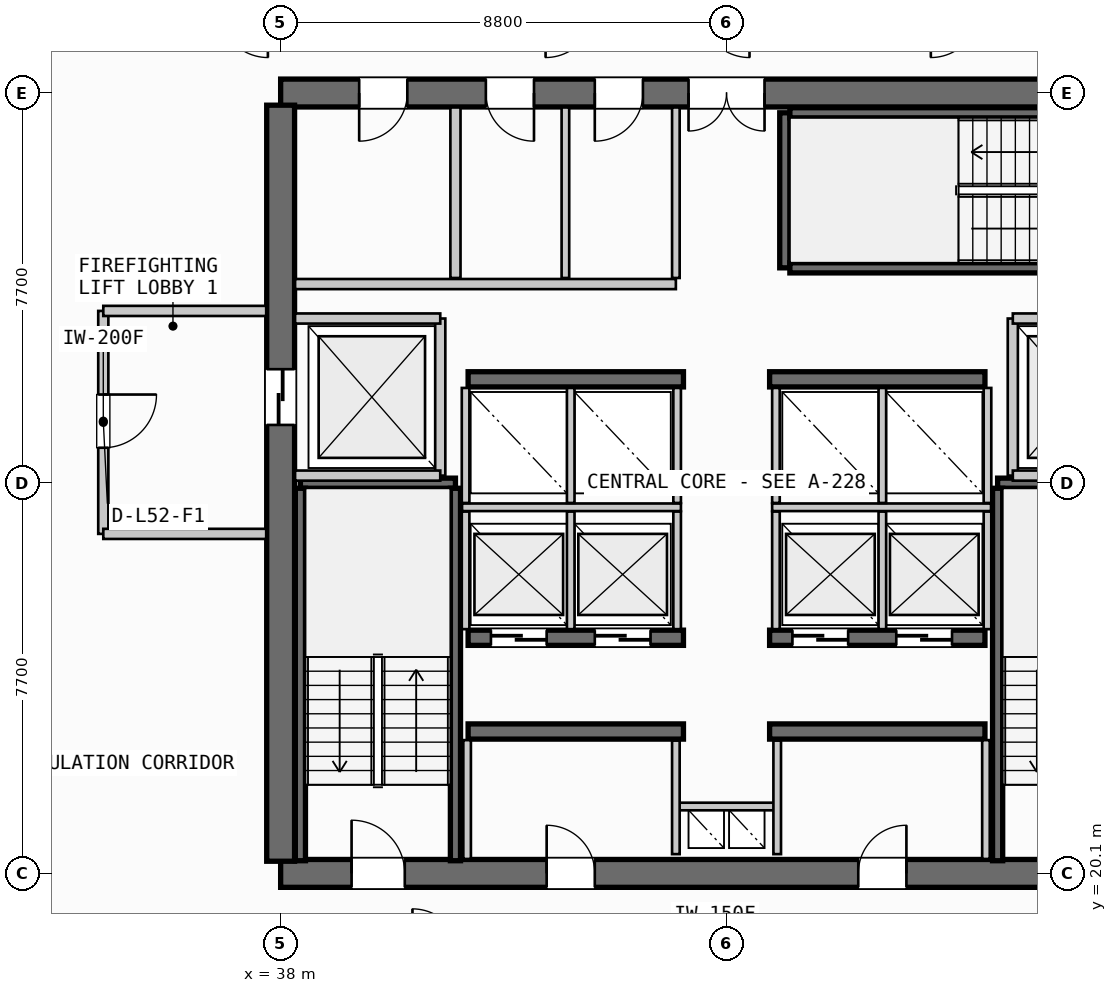
"""IFC4 building model, lengths in metres.
Left out: names, types, materials, properties, quantities, classifications, styles, units other than length and angle.
Written with IfcOpenShell. Run it as: python <this file> out.ifc"""

import sys

from ifc_helpers import new_model, si_unit, direction, frame, frame_2d, origin, place, context, subcontext, project, spatial, rectangle, extrude, source, transform, mapped, element, fill, save


model = new_model("IFC4")
c1 = context("Model", 3, precision=1e-05, world=origin(), true_north=direction((0.0, 1.0)))
c2 = subcontext(c1, "Body", "Model", "MODEL_VIEW")
j1 = project(units=[si_unit("LENGTHUNIT", "METRE"), si_unit("PLANEANGLEUNIT", "RADIAN")], contexts=[c1])
p1 = place(None, origin())
s1 = spatial("IfcSite", under=j1, at=p1, CompositionType="ELEMENT")
p2 = place(p1, origin())
s2 = spatial("IfcBuilding", under=s1, at=p2, CompositionType="ELEMENT")
p3 = place(p2, frame((0.0, 0.0, 200.9)))
s3 = spatial("IfcBuildingStorey", under=s2, at=p3, CompositionType="ELEMENT", Elevation=200.9)
p4 = place(p3, frame((38.0, 20.1, 0.0), z_axis=(0.0, 0.0, 1.0), x_axis=(1.0, 0.0, 0.0)))
e1 = element("IfcWall", 1, at=p4, inside=s3, PredefinedType="SHEAR", context=c2, shape_type="SweptSolid", body=[
    extrude(rectangle(XDim=17.6, YDim=0.55, at=frame_2d((8.8, 0.0))), origin(), (0.0, 0.0, 1.0), 3.26),
])
p5 = place(p4, frame((1.4, 0.0, 0.0)))
e2 = element("IfcOpeningElement", 2, at=p5, cuts=e1, PredefinedType="OPENING", context=c2, shape_type="SweptSolid", body=[
    extrude(rectangle(XDim=1.05, YDim=2.15, at=frame_2d((0.525, 1.075))), frame((0.0, 0.285, 0.0), z_axis=(0.0, -1.0, 0.0), x_axis=(1.0, 0.0, 0.0)), (0.0, 0.0, 1.0), 0.57),
])
p6 = place(p4, frame((15.15, 0.0, 0.0)))
e3 = element("IfcOpeningElement", 3, at=p6, cuts=e1, PredefinedType="OPENING", context=c2, shape_type="SweptSolid", body=[
    extrude(rectangle(XDim=1.05, YDim=2.15, at=frame_2d((0.525, 1.075))), frame((0.0, 0.285, 0.0), z_axis=(0.0, -1.0, 0.0), x_axis=(1.0, 0.0, 0.0)), (0.0, 0.0, 1.0), 0.57),
])
p7 = place(p4, frame((5.25, 0.0, 0.0)))
e4 = element("IfcOpeningElement", 4, at=p7, cuts=e1, PredefinedType="OPENING", context=c2, shape_type="SweptSolid", body=[
    extrude(rectangle(XDim=0.95, YDim=2.15, at=frame_2d((0.475, 1.075))), frame((0.0, 0.285, 0.0), z_axis=(0.0, -1.0, 0.0), x_axis=(1.0, 0.0, 0.0)), (0.0, 0.0, 1.0), 0.57),
])
p8 = place(p4, frame((11.4, 0.0, 0.0)))
e5 = element("IfcOpeningElement", 5, at=p8, cuts=e1, PredefinedType="OPENING", context=c2, shape_type="SweptSolid", body=[
    extrude(rectangle(XDim=0.95, YDim=2.15, at=frame_2d((0.475, 1.075))), frame((0.0, 0.285, 0.0), z_axis=(0.0, -1.0, 0.0), x_axis=(1.0, 0.0, 0.0)), (0.0, 0.0, 1.0), 0.57),
])
p9 = place(p3, frame((55.6, 35.5, 0.0), z_axis=(0.0, 0.0, 1.0), x_axis=(-1.0, 0.0, 0.0)))
e6 = element("IfcWall", 6, at=p9, inside=s3, PredefinedType="SHEAR", context=c2, shape_type="SweptSolid", body=[
    extrude(rectangle(XDim=17.6, YDim=0.55, at=frame_2d((8.8, 0.0))), origin(), (0.0, 0.0, 1.0), 3.26),
])
p10 = place(p9, frame((8.05, 0.0, 0.0)))
e7 = element("IfcOpeningElement", 7, at=p10, cuts=e6, PredefinedType="OPENING", context=c2, shape_type="SweptSolid", body=[
    extrude(rectangle(XDim=1.5, YDim=2.2, at=frame_2d((0.75, 1.1))), frame((0.0, 0.285, 0.0), z_axis=(0.0, -1.0, 0.0), x_axis=(1.0, 0.0, 0.0)), (0.0, 0.0, 1.0), 0.57),
])
p11 = place(p9, frame((15.1, 0.0, 0.0)))
e8 = element("IfcOpeningElement", 8, at=p11, cuts=e6, PredefinedType="OPENING", context=c2, shape_type="SweptSolid", body=[
    extrude(rectangle(XDim=0.95, YDim=2.15, at=frame_2d((0.475, 1.075))), frame((0.0, 0.285, 0.0), z_axis=(0.0, -1.0, 0.0), x_axis=(1.0, 0.0, 0.0)), (0.0, 0.0, 1.0), 0.57),
])
p12 = place(p9, frame((12.6, 0.0, 0.0)))
e9 = element("IfcOpeningElement", 9, at=p12, cuts=e6, PredefinedType="OPENING", context=c2, shape_type="SweptSolid", body=[
    extrude(rectangle(XDim=0.95, YDim=2.15, at=frame_2d((0.475, 1.075))), frame((0.0, 0.285, 0.0), z_axis=(0.0, -1.0, 0.0), x_axis=(1.0, 0.0, 0.0)), (0.0, 0.0, 1.0), 0.57),
])
p13 = place(p9, frame((10.45, 0.0, 0.0)))
e10 = element("IfcOpeningElement", 10, at=p13, cuts=e6, PredefinedType="OPENING", context=c2, shape_type="SweptSolid", body=[
    extrude(rectangle(XDim=0.95, YDim=2.15, at=frame_2d((0.475, 1.075))), frame((0.0, 0.285, 0.0), z_axis=(0.0, -1.0, 0.0), x_axis=(1.0, 0.0, 0.0)), (0.0, 0.0, 1.0), 0.57),
])
p14 = place(p3, frame((38.0, 35.26, 0.0), z_axis=(0.0, 0.0, 1.0), x_axis=(0.0, -1.0, 0.0)))
e11 = element("IfcWall", 11, at=p14, inside=s3, PredefinedType="SHEAR", context=c2, shape_type="SweptSolid", body=[
    extrude(rectangle(XDim=14.92, YDim=0.55, at=frame_2d((7.46, 0.0))), origin(), (0.0, 0.0, 1.0), 3.26),
])
p15 = place(p14, frame((5.21, 0.0, 0.0)))
e12 = element("IfcOpeningElement", 12, at=p15, cuts=e11, PredefinedType="OPENING", context=c2, shape_type="SweptSolid", body=[
    extrude(rectangle(XDim=1.1, YDim=2.2, at=frame_2d((0.55, 1.1))), frame((0.0, 0.285, 0.0), z_axis=(0.0, -1.0, 0.0), x_axis=(1.0, 0.0, 0.0)), (0.0, 0.0, 1.0), 0.57),
])
for number, where, z_axis, x_axis in (
    (13, (41.7, 22.9, 0.0), (0.0, 0.0, 1.0), (1.0, 0.0, 0.0)),
    (14, (47.65, 22.9, 0.0), (0.0, 0.0, 1.0), (1.0, 0.0, 0.0)),
):
    element("IfcWall", number, at=place(p3, frame(where, z_axis=z_axis, x_axis=x_axis)), inside=s3, PredefinedType="SHEAR", context=c2, shape_type="SweptSolid", body=[
        extrude(rectangle(XDim=4.25, YDim=0.3, at=frame_2d((2.125, 0.0))), origin(), (0.0, 0.0, 1.0), 3.26),
    ])
p16 = place(p3, frame((41.7, 24.75, 0.0), z_axis=(0.0, 0.0, 1.0), x_axis=(1.0, 0.0, 0.0)))
e15 = element("IfcWall", 15, at=p16, inside=s3, PredefinedType="SHEAR", context=c2, shape_type="SweptSolid", body=[
    extrude(rectangle(XDim=4.25, YDim=0.3, at=frame_2d((2.125, 0.0))), origin(), (0.0, 0.0, 1.0), 3.26),
])
p17 = place(p16, frame((0.45, 0.0, 0.0)))
e16 = element("IfcOpeningElement", 16, at=p17, cuts=e15, PredefinedType="OPENING", context=c2, shape_type="SweptSolid", body=[
    extrude(rectangle(XDim=1.1, YDim=2.2, at=frame_2d((0.55, 1.1))), frame((0.0, 0.16, 0.0), z_axis=(0.0, -1.0, 0.0), x_axis=(1.0, 0.0, 0.0)), (0.0, 0.0, 1.0), 0.32),
])
p18 = place(p16, frame((2.5, 0.0, 0.0)))
e17 = element("IfcOpeningElement", 17, at=p18, cuts=e15, PredefinedType="OPENING", context=c2, shape_type="SweptSolid", body=[
    extrude(rectangle(XDim=1.1, YDim=2.2, at=frame_2d((0.55, 1.1))), frame((0.0, 0.16, 0.0), z_axis=(0.0, -1.0, 0.0), x_axis=(1.0, 0.0, 0.0)), (0.0, 0.0, 1.0), 0.32),
])
p19 = place(p3, frame((47.65, 24.75, 0.0), z_axis=(0.0, 0.0, 1.0), x_axis=(1.0, 0.0, 0.0)))
e18 = element("IfcWall", 18, at=p19, inside=s3, PredefinedType="SHEAR", context=c2, shape_type="SweptSolid", body=[
    extrude(rectangle(XDim=4.25, YDim=0.3, at=frame_2d((2.125, 0.0))), origin(), (0.0, 0.0, 1.0), 3.26),
])
p20 = place(p19, frame((0.45, 0.0, 0.0)))
e19 = element("IfcOpeningElement", 19, at=p20, cuts=e18, PredefinedType="OPENING", context=c2, shape_type="SweptSolid", body=[
    extrude(rectangle(XDim=1.1, YDim=2.2, at=frame_2d((0.55, 1.1))), frame((0.0, 0.16, 0.0), z_axis=(0.0, -1.0, 0.0), x_axis=(1.0, 0.0, 0.0)), (0.0, 0.0, 1.0), 0.32),
])
p21 = place(p19, frame((2.5, 0.0, 0.0)))
e20 = element("IfcOpeningElement", 20, at=p21, cuts=e18, PredefinedType="OPENING", context=c2, shape_type="SweptSolid", body=[
    extrude(rectangle(XDim=1.1, YDim=2.2, at=frame_2d((0.55, 1.1))), frame((0.0, 0.16, 0.0), z_axis=(0.0, -1.0, 0.0), x_axis=(1.0, 0.0, 0.0)), (0.0, 0.0, 1.0), 0.32),
])
for number, where, z_axis, x_axis in (
    (21, (41.7, 29.85, 0.0), (0.0, 0.0, 1.0), (1.0, 0.0, 0.0)),
    (22, (47.65, 29.85, 0.0), (0.0, 0.0, 1.0), (1.0, 0.0, 0.0)),
):
    element("IfcWall", number, at=place(p3, frame(where, z_axis=z_axis, x_axis=x_axis)), inside=s3, PredefinedType="SHEAR", context=c2, shape_type="SweptSolid", body=[
        extrude(rectangle(XDim=4.25, YDim=0.3, at=frame_2d((2.125, 0.0))), origin(), (0.0, 0.0, 1.0), 3.26),
    ])
p22 = place(p3, frame((38.39, 27.8, 0.0), z_axis=(0.0, 0.0, 1.0), x_axis=(1.0, 0.0, 0.0)))
e23 = element("IfcWall", 23, at=p22, inside=s3, PredefinedType="SHEAR", context=c2, shape_type="SweptSolid", body=[
    extrude(rectangle(XDim=3.06, YDim=0.2, at=frame_2d((1.53, 0.0))), origin(), (0.0, 0.0, 1.0), 3.26),
])
for number, where, z_axis, x_axis in (
    (24, (41.45, 27.7, 0.0), (0.0, 0.0, 1.0), (0.0, -1.0, 0.0)),
    (25, (38.39, 20.35, 0.0), (0.0, 0.0, 1.0), (0.0, 1.0, 0.0)),
):
    element("IfcWall", number, at=place(p3, frame(where, z_axis=z_axis, x_axis=x_axis)), inside=s3, PredefinedType="SHEAR", context=c2, shape_type="SweptSolid", body=[
        extrude(rectangle(XDim=7.35, YDim=0.2, at=frame_2d((3.675, 0.0))), origin(), (0.0, 0.0, 1.0), 3.26),
    ])
p23 = place(p3, frame((52.15, 27.8, 0.0), z_axis=(0.0, 0.0, 1.0), x_axis=(1.0, 0.0, 0.0)))
e26 = element("IfcWall", 26, at=p23, inside=s3, PredefinedType="SHEAR", context=c2, shape_type="SweptSolid", body=[
    extrude(rectangle(XDim=3.06, YDim=0.2, at=frame_2d((1.53, 0.0))), origin(), (0.0, 0.0, 1.0), 3.26),
])
p24 = place(p3, frame((52.15, 20.35, 0.0), z_axis=(0.0, 0.0, 1.0), x_axis=(0.0, 1.0, 0.0)))
e27 = element("IfcWall", 27, at=p24, inside=s3, PredefinedType="SHEAR", context=c2, shape_type="SweptSolid", body=[
    extrude(rectangle(XDim=7.35, YDim=0.2, at=frame_2d((3.675, 0.0))), origin(), (0.0, 0.0, 1.0), 3.26),
])
p25 = place(p3, frame((47.95, 32.05, 0.0), z_axis=(0.0, 0.0, 1.0), x_axis=(0.0, 1.0, 0.0)))
e28 = element("IfcWall", 28, at=p25, inside=s3, PredefinedType="SHEAR", context=c2, shape_type="SweptSolid", body=[
    extrude(rectangle(XDim=3.06, YDim=0.2, at=frame_2d((1.53, 0.0))), origin(), (0.0, 0.0, 1.0), 3.26),
])
for number, where, z_axis, x_axis in (
    (29, (48.05, 35.11, 0.0), (0.0, 0.0, 1.0), (1.0, 0.0, 0.0)),
    (30, (55.4, 32.05, 0.0), (0.0, 0.0, 1.0), (-1.0, 0.0, 0.0)),
):
    element("IfcWall", number, at=place(p3, frame(where, z_axis=z_axis, x_axis=x_axis)), inside=s3, PredefinedType="SHEAR", context=c2, shape_type="SweptSolid", body=[
        extrude(rectangle(XDim=7.35, YDim=0.2, at=frame_2d((3.675, 0.0))), origin(), (0.0, 0.0, 1.0), 3.26),
    ])
p26 = place(p3, frame((45.8, 21.42, 0.0), z_axis=(0.0, 0.0, 1.0), x_axis=(1.0, 0.0, 0.0)))
e31 = element("IfcWall", 31, at=p26, inside=s3, PredefinedType="PARTITIONING", context=c2, shape_type="SweptSolid", body=[
    extrude(rectangle(XDim=2.0, YDim=0.15, at=frame_2d((1.0, 0.0))), origin(), (0.0, 0.0, 1.0), 2.595),
])
for number, where, z_axis, x_axis in (
    (32, (45.8, 20.48, 0.0), (0.0, 0.0, 1.0), (0.0, 1.0, 0.0)),
    (33, (47.8, 20.48, 0.0), (0.0, 0.0, 1.0), (0.0, 1.0, 0.0)),
):
    element("IfcWall", number, at=place(p3, frame(where, z_axis=z_axis, x_axis=x_axis)), inside=s3, PredefinedType="PARTITIONING", context=c2, shape_type="SweptSolid", body=[
        extrude(rectangle(XDim=2.24, YDim=0.15, at=frame_2d((1.12, 0.0))), origin(), (0.0, 0.0, 1.0), 2.595),
    ])
p27 = place(p3, frame((41.15, 27.95, 0.0), z_axis=(0.0, 0.0, 1.0), x_axis=(0.0, 1.0, 0.0)))
e34 = element("IfcWall", 34, at=p27, inside=s3, PredefinedType="PARTITIONING", context=c2, shape_type="SweptSolid", body=[
    extrude(rectangle(XDim=3.1, YDim=0.2, at=frame_2d((1.55, 0.0))), origin(), (0.0, 0.0, 1.0), 2.595),
])
for number, where, z_axis, x_axis in (
    (35, (38.285, 27.95, 0.0), (0.0, 0.0, 1.0), (1.0, 0.0, 0.0)),
    (36, (38.285, 31.05, 0.0), (0.0, 0.0, 1.0), (1.0, 0.0, 0.0)),
):
    element("IfcWall", number, at=place(p3, frame(where, z_axis=z_axis, x_axis=x_axis)), inside=s3, PredefinedType="PARTITIONING", context=c2, shape_type="SweptSolid", body=[
        extrude(rectangle(XDim=2.865, YDim=0.2, at=frame_2d((1.433, 0.0))), origin(), (0.0, 0.0, 1.0), 2.595),
    ])
p28 = place(p3, frame((34.5, 31.2, 0.0), z_axis=(0.0, 0.0, 1.0), x_axis=(0.0, -1.0, 0.0)))
e37 = element("IfcWall", 37, at=p28, inside=s3, PredefinedType="PARTITIONING", context=c2, shape_type="SweptSolid", body=[
    extrude(rectangle(XDim=4.4, YDim=0.2, at=frame_2d((2.2, 0.0))), origin(), (0.0, 0.0, 1.0), 2.595),
])
p29 = place(p28, frame((1.65, 0.0, 0.0)))
e38 = element("IfcOpeningElement", 38, at=p29, cuts=e37, PredefinedType="OPENING", context=c2, shape_type="SweptSolid", body=[
    extrude(rectangle(XDim=1.05, YDim=2.15, at=frame_2d((0.525, 1.075))), frame((0.0, 0.11, 0.0), z_axis=(0.0, -1.0, 0.0), x_axis=(1.0, 0.0, 0.0)), (0.0, 0.0, 1.0), 0.22),
])
for number, where, z_axis, x_axis in (
    (39, (34.5, 26.8, 0.0), (0.0, 0.0, 1.0), (1.0, 0.0, 0.0)),
    (40, (34.5, 31.2, 0.0), (0.0, 0.0, 1.0), (1.0, 0.0, 0.0)),
):
    element("IfcWall", number, at=place(p3, frame(where, z_axis=z_axis, x_axis=x_axis)), inside=s3, PredefinedType="PARTITIONING", context=c2, shape_type="SweptSolid", body=[
        extrude(rectangle(XDim=3.215, YDim=0.2, at=frame_2d((1.607, 0.0))), origin(), (0.0, 0.0, 1.0), 2.595),
    ])
p30 = place(p3, frame((52.45, 27.95, 0.0), z_axis=(0.0, 0.0, 1.0), x_axis=(0.0, 1.0, 0.0)))
e41 = element("IfcWall", 41, at=p30, inside=s3, PredefinedType="PARTITIONING", context=c2, shape_type="SweptSolid", body=[
    extrude(rectangle(XDim=3.1, YDim=0.2, at=frame_2d((1.55, 0.0))), origin(), (0.0, 0.0, 1.0), 2.595),
])
for number, where, z_axis, x_axis in (
    (42, (52.45, 27.95, 0.0), (0.0, 0.0, 1.0), (1.0, 0.0, 0.0)),
    (43, (52.45, 31.05, 0.0), (0.0, 0.0, 1.0), (1.0, 0.0, 0.0)),
):
    element("IfcWall", number, at=place(p3, frame(where, z_axis=z_axis, x_axis=x_axis)), inside=s3, PredefinedType="PARTITIONING", context=c2, shape_type="SweptSolid", body=[
        extrude(rectangle(XDim=2.865, YDim=0.2, at=frame_2d((1.433, 0.0))), origin(), (0.0, 0.0, 1.0), 2.595),
    ])
for number, where, z_axis, x_axis in (
    (44, (41.68, 20.385, 0.0), (0.0, 0.0, 1.0), (0.0, 1.0, 0.0)),
    (45, (51.92, 20.385, 0.0), (0.0, 0.0, 1.0), (0.0, 1.0, 0.0)),
):
    element("IfcWall", number, at=place(p3, frame(where, z_axis=z_axis, x_axis=x_axis)), inside=s3, PredefinedType="PARTITIONING", context=c2, shape_type="SweptSolid", body=[
        extrude(rectangle(XDim=2.345, YDim=0.15, at=frame_2d((1.172, 0.0))), origin(), (0.0, 0.0, 1.0), 2.595),
    ])
p31 = place(p3, frame((41.58, 27.325, 0.0), z_axis=(0.0, 0.0, 1.0), x_axis=(1.0, 0.0, 0.0)))
e46 = element("IfcWall", 46, at=p31, inside=s3, PredefinedType="PARTITIONING", context=c2, shape_type="SweptSolid", body=[
    extrude(rectangle(XDim=4.32, YDim=0.15, at=frame_2d((2.16, 0.0))), origin(), (0.0, 0.0, 1.0), 2.595),
])
p32 = place(p3, frame((47.7, 27.325, 0.0), z_axis=(0.0, 0.0, 1.0), x_axis=(1.0, 0.0, 0.0)))
e47 = element("IfcWall", 47, at=p32, inside=s3, PredefinedType="PARTITIONING", context=c2, shape_type="SweptSolid", body=[
    extrude(rectangle(XDim=4.32, YDim=0.15, at=frame_2d((2.16, 0.0))), origin(), (0.0, 0.0, 1.0), 2.595),
])
for number, where, z_axis, x_axis in (
    (48, (41.65, 24.92, 0.0), (0.0, 0.0, 1.0), (0.0, 1.0, 0.0)),
    (49, (43.725, 24.92, 0.0), (0.0, 0.0, 1.0), (0.0, 1.0, 0.0)),
    (50, (45.825, 24.92, 0.0), (0.0, 0.0, 1.0), (0.0, 1.0, 0.0)),
    (51, (47.775, 24.92, 0.0), (0.0, 0.0, 1.0), (0.0, 1.0, 0.0)),
    (52, (49.875, 24.92, 0.0), (0.0, 0.0, 1.0), (0.0, 1.0, 0.0)),
    (53, (51.95, 24.92, 0.0), (0.0, 0.0, 1.0), (0.0, 1.0, 0.0)),
):
    element("IfcWall", number, at=place(p3, frame(where, z_axis=z_axis, x_axis=x_axis)), inside=s3, PredefinedType="PARTITIONING", context=c2, shape_type="SweptSolid", body=[
        extrude(rectangle(XDim=2.32, YDim=0.15, at=frame_2d((1.16, 0.0))), origin(), (0.0, 0.0, 1.0), 2.595),
    ])
for number, where, z_axis, x_axis in (
    (54, (41.65, 27.41, 0.0), (0.0, 0.0, 1.0), (0.0, 1.0, 0.0)),
    (55, (43.725, 27.41, 0.0), (0.0, 0.0, 1.0), (0.0, 1.0, 0.0)),
    (56, (45.825, 27.41, 0.0), (0.0, 0.0, 1.0), (0.0, 1.0, 0.0)),
    (57, (47.775, 27.41, 0.0), (0.0, 0.0, 1.0), (0.0, 1.0, 0.0)),
    (58, (49.875, 27.41, 0.0), (0.0, 0.0, 1.0), (0.0, 1.0, 0.0)),
    (59, (51.95, 27.41, 0.0), (0.0, 0.0, 1.0), (0.0, 1.0, 0.0)),
):
    element("IfcWall", number, at=place(p3, frame(where, z_axis=z_axis, x_axis=x_axis)), inside=s3, PredefinedType="PARTITIONING", context=c2, shape_type="SweptSolid", body=[
        extrude(rectangle(XDim=2.27, YDim=0.15, at=frame_2d((1.135, 0.0))), origin(), (0.0, 0.0, 1.0), 2.595),
    ])
p33 = place(p3, frame((41.45, 31.85, 0.0), z_axis=(0.0, 0.0, 1.0), x_axis=(0.0, 1.0, 0.0)))
e60 = element("IfcWall", 60, at=p33, inside=s3, PredefinedType="PARTITIONING", context=c2, shape_type="SweptSolid", body=[
    extrude(rectangle(XDim=3.365, YDim=0.2, at=frame_2d((1.683, 0.0))), origin(), (0.0, 0.0, 1.0), 2.595),
])
p34 = place(p3, frame((38.285, 31.73, 0.0), z_axis=(0.0, 0.0, 1.0), x_axis=(1.0, 0.0, 0.0)))
e61 = element("IfcWall", 61, at=p34, inside=s3, PredefinedType="PARTITIONING", context=c2, shape_type="SweptSolid", body=[
    extrude(rectangle(XDim=7.515, YDim=0.2, at=frame_2d((3.758, 0.0))), origin(), (0.0, 0.0, 1.0), 2.595),
])
p35 = place(p3, frame((45.8, 31.85, 0.0), z_axis=(0.0, 0.0, 1.0), x_axis=(0.0, 1.0, 0.0)))
e62 = element("IfcWall", 62, at=p35, inside=s3, PredefinedType="PARTITIONING", context=c2, shape_type="SweptSolid", body=[
    extrude(rectangle(XDim=3.365, YDim=0.15, at=frame_2d((1.683, 0.0))), origin(), (0.0, 0.0, 1.0), 2.595),
])
p36 = place(p3, frame((43.62, 31.85, 0.0), z_axis=(0.0, 0.0, 1.0), x_axis=(0.0, 1.0, 0.0)))
e63 = element("IfcWall", 63, at=p36, inside=s3, PredefinedType="PLUMBINGWALL", context=c2, shape_type="SweptSolid", body=[
    extrude(rectangle(XDim=3.365, YDim=0.15, at=frame_2d((1.683, 0.0))), origin(), (0.0, 0.0, 1.0), 2.595),
])
m1 = source(origin(), c2, "Body", "SweptSolid", [
    extrude(rectangle(XDim=1.05, YDim=2.15, at=frame_2d((0.525, 1.075))), frame((0.0, 0.025, 0.0), z_axis=(0.0, -1.0, 0.0), x_axis=(1.0, 0.0, 0.0)), (0.0, 0.0, 1.0), 0.05),
])
p37 = place(p5, origin())
e64 = element("IfcDoor", 64, at=p37, inside=s3, OperationType="SINGLE_SWING_LEFT", PredefinedType="DOOR", context=c2, shape_type="MappedRepresentation", body=[
    mapped(m1, transform((0.0, 0.0, 0.0), scale=1.0)),
])
fill(e2, e64)
m2 = source(origin(), c2, "Body", "SweptSolid", [
    extrude(rectangle(XDim=1.5, YDim=2.2, at=frame_2d((0.75, 1.1))), frame((0.0, 0.025, 0.0), z_axis=(0.0, -1.0, 0.0), x_axis=(1.0, 0.0, 0.0)), (0.0, 0.0, 1.0), 0.05),
])
p38 = place(p10, origin())
e65 = element("IfcDoor", 65, at=p38, inside=s3, OperationType="DOUBLE_DOOR_SINGLE_SWING", PredefinedType="DOOR", context=c2, shape_type="MappedRepresentation", body=[
    mapped(m2, transform((0.0, 0.0, 0.0), scale=1.0)),
])
fill(e7, e65)
m3 = source(origin(), c2, "Body", "SweptSolid", [
    extrude(rectangle(XDim=1.1, YDim=2.2, at=frame_2d((0.55, 1.1))), frame((0.0, 0.025, 0.0), z_axis=(0.0, -1.0, 0.0), x_axis=(1.0, 0.0, 0.0)), (0.0, 0.0, 1.0), 0.05),
])
p39 = place(p15, origin())
e66 = element("IfcDoor", 66, at=p39, inside=s3, OperationType="SLIDING_TO_LEFT", PredefinedType="DOOR", context=c2, shape_type="MappedRepresentation", body=[
    mapped(m3, transform((0.0, 0.0, 0.0), scale=1.0)),
])
fill(e12, e66)
m4 = source(origin(), c2, "Body", "SweptSolid", [
    extrude(rectangle(XDim=0.95, YDim=2.15, at=frame_2d((0.475, 1.075))), frame((0.0, 0.025, 0.0), z_axis=(0.0, -1.0, 0.0), x_axis=(1.0, 0.0, 0.0)), (0.0, 0.0, 1.0), 0.05),
])
p40 = place(p7, origin())
e67 = element("IfcDoor", 67, at=p40, inside=s3, OperationType="SINGLE_SWING_LEFT", PredefinedType="DOOR", context=c2, shape_type="MappedRepresentation", body=[
    mapped(m4, transform((0.0, 0.0, 0.0), scale=1.0)),
])
fill(e4, e67)
p41 = place(p8, origin())
e68 = element("IfcDoor", 68, at=p41, inside=s3, OperationType="SINGLE_SWING_RIGHT", PredefinedType="DOOR", context=c2, shape_type="MappedRepresentation", body=[
    mapped(m4, transform((0.0, 0.0, 0.0), scale=1.0)),
])
fill(e5, e68)
p42 = place(p17, origin())
e69 = element("IfcDoor", 69, at=p42, inside=s3, OperationType="SLIDING_TO_RIGHT", PredefinedType="DOOR", context=c2, shape_type="MappedRepresentation", body=[
    mapped(m3, transform((0.0, 0.0, 0.0), scale=1.0)),
])
fill(e16, e69)
p43 = place(p18, origin())
e70 = element("IfcDoor", 70, at=p43, inside=s3, OperationType="SLIDING_TO_RIGHT", PredefinedType="DOOR", context=c2, shape_type="MappedRepresentation", body=[
    mapped(m3, transform((0.0, 0.0, 0.0), scale=1.0)),
])
fill(e17, e70)
p44 = place(p20, origin())
e71 = element("IfcDoor", 71, at=p44, inside=s3, OperationType="SLIDING_TO_RIGHT", PredefinedType="DOOR", context=c2, shape_type="MappedRepresentation", body=[
    mapped(m3, transform((0.0, 0.0, 0.0), scale=1.0)),
])
fill(e19, e71)
p45 = place(p21, origin())
e72 = element("IfcDoor", 72, at=p45, inside=s3, OperationType="SLIDING_TO_RIGHT", PredefinedType="DOOR", context=c2, shape_type="MappedRepresentation", body=[
    mapped(m3, transform((0.0, 0.0, 0.0), scale=1.0)),
])
fill(e20, e72)
p46 = place(p11, origin())
e73 = element("IfcDoor", 73, at=p46, inside=s3, OperationType="SINGLE_SWING_RIGHT", PredefinedType="DOOR", context=c2, shape_type="MappedRepresentation", body=[
    mapped(m4, transform((0.0, 0.0, 0.0), scale=1.0)),
])
fill(e8, e73)
p47 = place(p12, origin())
e74 = element("IfcDoor", 74, at=p47, inside=s3, OperationType="SINGLE_SWING_LEFT", PredefinedType="DOOR", context=c2, shape_type="MappedRepresentation", body=[
    mapped(m4, transform((0.0, 0.0, 0.0), scale=1.0)),
])
fill(e9, e74)
p48 = place(p13, origin())
e75 = element("IfcDoor", 75, at=p48, inside=s3, OperationType="SINGLE_SWING_RIGHT", PredefinedType="DOOR", context=c2, shape_type="MappedRepresentation", body=[
    mapped(m4, transform((0.0, 0.0, 0.0), scale=1.0)),
])
fill(e10, e75)
p49 = place(p29, origin())
e76 = element("IfcDoor", 76, at=p49, inside=s3, OperationType="SINGLE_SWING_LEFT", PredefinedType="DOOR", context=c2, shape_type="MappedRepresentation", body=[
    mapped(m1, transform((0.0, 0.0, 0.0), scale=1.0)),
])
fill(e38, e76)
save(model, sys.argv[1])
